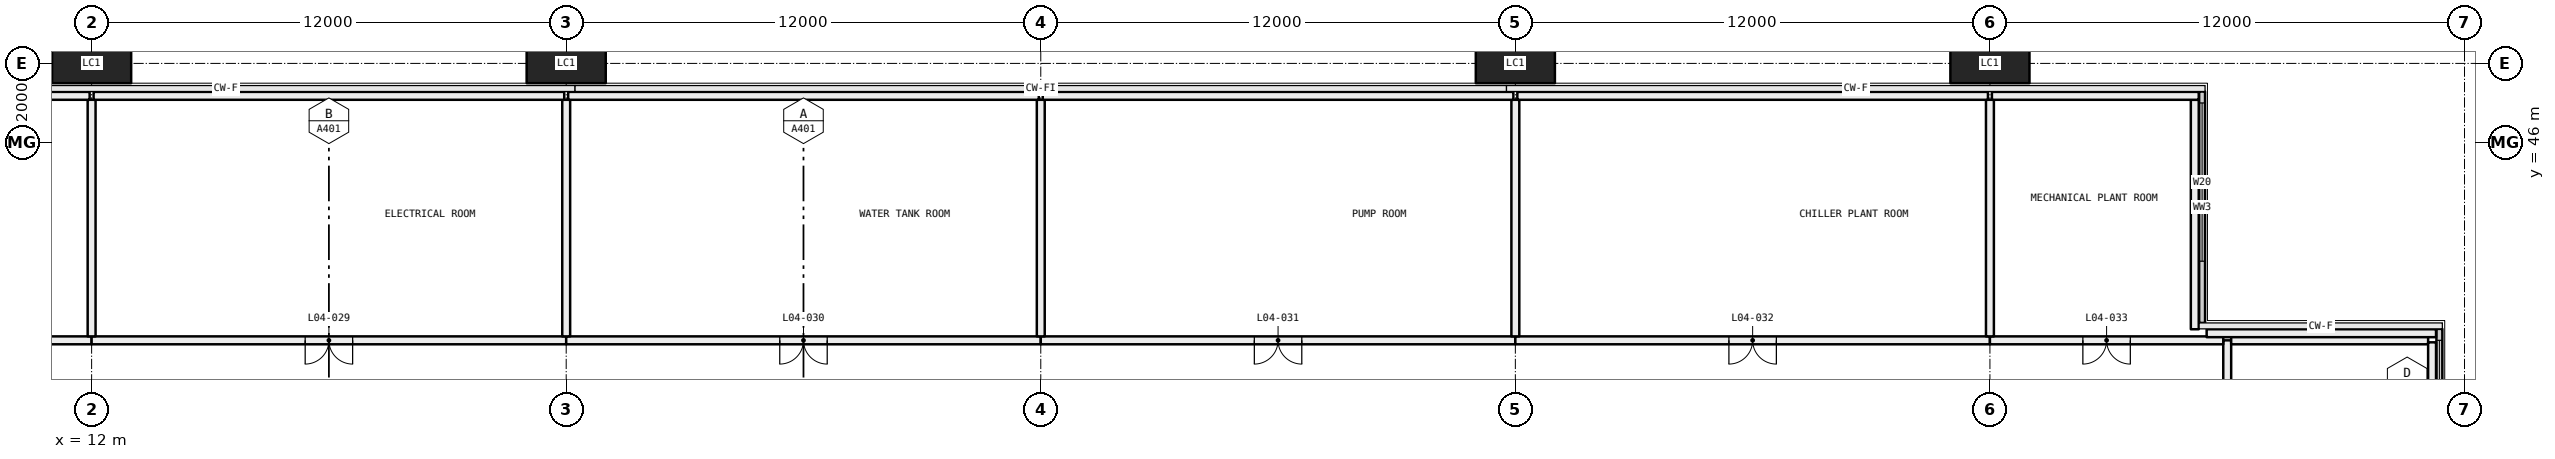
"""IFC4 building model, lengths in metres.
Left out: names, types, materials, properties, quantities, classifications, styles, units other than length and angle.
Written with IfcOpenShell. Run it as: python <this file> out.ifc"""

import sys

from ifc_helpers import new_model, si_unit, direction, frame, frame_2d, origin, origin_2d, place, context, subcontext, project, spatial, rectangle, hollow_rectangle, extrude, element, fill, save


model = new_model("IFC4")
c1 = context("Model", 3, precision=1e-05, world=origin(), true_north=direction((0.0, 1.0)))
c2 = subcontext(c1, "Body", "Model", "MODEL_VIEW")
j1 = project(units=[si_unit("LENGTHUNIT", "METRE"), si_unit("PLANEANGLEUNIT", "RADIAN")], contexts=[c1])
p1 = place(None, origin())
s1 = spatial("IfcSite", under=j1, at=p1, CompositionType="ELEMENT")
p2 = place(p1, origin())
s2 = spatial("IfcBuilding", under=s1, at=p2, CompositionType="ELEMENT")
p3 = place(p2, frame((0.0, 0.0, 24.0)))
s3 = spatial("IfcBuildingStorey", under=s2, at=p3, CompositionType="ELEMENT", Elevation=24.0)
for number, where, z_axis, x_axis in (
    (1, (12.0, 48.0, -0.4), (0.0, 0.0, 1.0), (1.0, 0.0, 0.0)),
    (2, (24.0, 48.0, -0.4), (0.0, 0.0, 1.0), (1.0, 0.0, 0.0)),
    (3, (48.0, 48.0, -0.4), (0.0, 0.0, 1.0), (1.0, 0.0, 0.0)),
    (4, (60.0, 48.0, -0.4), (0.0, 0.0, 1.0), (1.0, 0.0, 0.0)),
):
    element("IfcColumn", number, at=place(p3, frame(where, z_axis=z_axis, x_axis=x_axis)), inside=s3, PredefinedType="COLUMN", context=c2, shape_type="SweptSolid", body=[
        extrude(hollow_rectangle(XDim=2.0, YDim=1.0, WallThickness=0.08, at=origin_2d()), origin(), (0.0, 0.0, 1.0), 6.0),
    ])
p4 = place(p3, frame((71.365, 6.71, 0.0), z_axis=(0.0, 0.0, 1.0), x_axis=(0.0, 1.0, 0.0)))
e5 = element("IfcWall", 5, at=p4, inside=s3, PredefinedType="ELEMENTEDWALL", context=c2, shape_type="SweptSolid", body=[
    extrude(rectangle(XDim=34.58, YDim=0.15, at=frame_2d((17.29, 0.0))), origin(), (0.0, 0.0, 1.0), 5.6),
])
p5 = place(p4, frame((0.29, 0.0, 3.0)))
e6 = element("IfcOpeningElement", 6, at=p5, cuts=e5, PredefinedType="OPENING", context=c2, shape_type="SweptSolid", body=[
    extrude(rectangle(XDim=4.5, YDim=2.55, at=frame_2d((2.25, 1.275))), frame((0.0, 0.085, 0.0), z_axis=(0.0, -1.0, 0.0), x_axis=(1.0, 0.0, 0.0)), (0.0, 0.0, 1.0), 0.17),
])
p6 = place(p4, frame((5.79, 0.0, 3.0)))
e7 = element("IfcOpeningElement", 7, at=p6, cuts=e5, PredefinedType="OPENING", context=c2, shape_type="SweptSolid", body=[
    extrude(rectangle(XDim=5.0, YDim=2.55, at=frame_2d((2.5, 1.275))), frame((0.0, 0.085, 0.0), z_axis=(0.0, -1.0, 0.0), x_axis=(1.0, 0.0, 0.0)), (0.0, 0.0, 1.0), 0.17),
])
p7 = place(p4, frame((11.79, 0.0, 3.0)))
e8 = element("IfcOpeningElement", 8, at=p7, cuts=e5, PredefinedType="OPENING", context=c2, shape_type="SweptSolid", body=[
    extrude(rectangle(XDim=5.0, YDim=2.55, at=frame_2d((2.5, 1.275))), frame((0.0, 0.085, 0.0), z_axis=(0.0, -1.0, 0.0), x_axis=(1.0, 0.0, 0.0)), (0.0, 0.0, 1.0), 0.17),
])
p8 = place(p4, frame((17.79, 0.0, 3.0)))
e9 = element("IfcOpeningElement", 9, at=p8, cuts=e5, PredefinedType="OPENING", context=c2, shape_type="SweptSolid", body=[
    extrude(rectangle(XDim=5.0, YDim=2.55, at=frame_2d((2.5, 1.275))), frame((0.0, 0.085, 0.0), z_axis=(0.0, -1.0, 0.0), x_axis=(1.0, 0.0, 0.0)), (0.0, 0.0, 1.0), 0.17),
])
p9 = place(p4, frame((23.79, 0.0, 3.0)))
e10 = element("IfcOpeningElement", 10, at=p9, cuts=e5, PredefinedType="OPENING", context=c2, shape_type="SweptSolid", body=[
    extrude(rectangle(XDim=2.0, YDim=2.55, at=frame_2d((1.0, 1.275))), frame((0.0, 0.085, 0.0), z_axis=(0.0, -1.0, 0.0), x_axis=(1.0, 0.0, 0.0)), (0.0, 0.0, 1.0), 0.17),
])
p10 = place(p4, frame((26.79, 0.0, 3.0)))
e11 = element("IfcOpeningElement", 11, at=p10, cuts=e5, PredefinedType="OPENING", context=c2, shape_type="SweptSolid", body=[
    extrude(rectangle(XDim=2.0, YDim=2.55, at=frame_2d((1.0, 1.275))), frame((0.0, 0.085, 0.0), z_axis=(0.0, -1.0, 0.0), x_axis=(1.0, 0.0, 0.0)), (0.0, 0.0, 1.0), 0.17),
])
p11 = place(p4, frame((29.79, 0.0, 3.0)))
e12 = element("IfcOpeningElement", 12, at=p11, cuts=e5, PredefinedType="OPENING", context=c2, shape_type="SweptSolid", body=[
    extrude(rectangle(XDim=4.5, YDim=2.55, at=frame_2d((2.25, 1.275))), frame((0.0, 0.085, 0.0), z_axis=(0.0, -1.0, 0.0), x_axis=(1.0, 0.0, 0.0)), (0.0, 0.0, 1.0), 0.17),
])
p12 = place(p3, frame((65.365, 41.44, 0.0), z_axis=(0.0, 0.0, 1.0), x_axis=(0.0, 1.0, 0.0)))
e13 = element("IfcWall", 13, at=p12, inside=s3, PredefinedType="ELEMENTEDWALL", context=c2, shape_type="SweptSolid", body=[
    extrude(rectangle(XDim=5.85, YDim=0.15, at=frame_2d((2.925, 0.0))), origin(), (0.0, 0.0, 1.0), 5.6),
])
p13 = place(p12, frame((1.56, 0.0, 3.0)))
e14 = element("IfcOpeningElement", 14, at=p13, cuts=e13, PredefinedType="OPENING", context=c2, shape_type="SweptSolid", body=[
    extrude(rectangle(XDim=4.0, YDim=2.55, at=frame_2d((2.0, 1.275))), frame((0.0, 0.085, 0.0), z_axis=(0.0, -1.0, 0.0), x_axis=(1.0, 0.0, 0.0)), (0.0, 0.0, 1.0), 0.17),
])
p14 = place(p3, frame((66.0, 36.1, 0.0), z_axis=(0.0, 0.0, 1.0), x_axis=(0.0, 1.0, 0.0)))
e15 = element("IfcWall", 15, at=p14, inside=s3, PredefinedType="PARTITIONING", context=c2, shape_type="SweptSolid", body=[
    extrude(rectangle(XDim=4.9, YDim=0.2, at=frame_2d((2.45, 0.0))), origin(), (0.0, 0.0, 1.0), 5.6),
])
p15 = place(p3, frame((12.0, 41.0, 0.0), z_axis=(0.0, 0.0, 1.0), x_axis=(-1.0, 0.0, 0.0)))
e16 = element("IfcWall", 16, at=p15, inside=s3, PredefinedType="PARTITIONING", context=c2, shape_type="SweptSolid", body=[
    extrude(rectangle(XDim=5.9, YDim=0.2, at=frame_2d((2.95, 0.0))), origin(), (0.0, 0.0, 1.0), 5.6),
])
p16 = place(p15, frame((2.35, 0.0, 0.0)))
e17 = element("IfcOpeningElement", 17, at=p16, cuts=e16, PredefinedType="OPENING", context=c2, shape_type="SweptSolid", body=[
    extrude(rectangle(XDim=1.2, YDim=2.1, at=frame_2d((0.6, 1.05))), frame((0.0, 0.11, 0.0), z_axis=(0.0, -1.0, 0.0), x_axis=(1.0, 0.0, 0.0)), (0.0, 0.0, 1.0), 0.22),
])
p17 = place(p3, frame((24.0, 41.0, 0.0), z_axis=(0.0, 0.0, 1.0), x_axis=(-1.0, 0.0, 0.0)))
e18 = element("IfcWall", 18, at=p17, inside=s3, PredefinedType="PARTITIONING", context=c2, shape_type="SweptSolid", body=[
    extrude(rectangle(XDim=12.0, YDim=0.2, at=frame_2d((6.0, 0.0))), origin(), (0.0, 0.0, 1.0), 5.6),
])
p18 = place(p17, frame((5.4, 0.0, 0.0)))
e19 = element("IfcOpeningElement", 19, at=p18, cuts=e18, PredefinedType="OPENING", context=c2, shape_type="SweptSolid", body=[
    extrude(rectangle(XDim=1.2, YDim=2.1, at=frame_2d((0.6, 1.05))), frame((0.0, 0.11, 0.0), z_axis=(0.0, -1.0, 0.0), x_axis=(1.0, 0.0, 0.0)), (0.0, 0.0, 1.0), 0.22),
])
p19 = place(p3, frame((36.0, 41.0, 0.0), z_axis=(0.0, 0.0, 1.0), x_axis=(-1.0, 0.0, 0.0)))
e20 = element("IfcWall", 20, at=p19, inside=s3, PredefinedType="PARTITIONING", context=c2, shape_type="SweptSolid", body=[
    extrude(rectangle(XDim=12.0, YDim=0.2, at=frame_2d((6.0, 0.0))), origin(), (0.0, 0.0, 1.0), 5.6),
])
p20 = place(p19, frame((5.4, 0.0, 0.0)))
e21 = element("IfcOpeningElement", 21, at=p20, cuts=e20, PredefinedType="OPENING", context=c2, shape_type="SweptSolid", body=[
    extrude(rectangle(XDim=1.2, YDim=2.1, at=frame_2d((0.6, 1.05))), frame((0.0, 0.11, 0.0), z_axis=(0.0, -1.0, 0.0), x_axis=(1.0, 0.0, 0.0)), (0.0, 0.0, 1.0), 0.22),
])
p21 = place(p3, frame((48.0, 41.0, 0.0), z_axis=(0.0, 0.0, 1.0), x_axis=(-1.0, 0.0, 0.0)))
e22 = element("IfcWall", 22, at=p21, inside=s3, PredefinedType="PARTITIONING", context=c2, shape_type="SweptSolid", body=[
    extrude(rectangle(XDim=12.0, YDim=0.2, at=frame_2d((6.0, 0.0))), origin(), (0.0, 0.0, 1.0), 5.6),
])
p22 = place(p21, frame((5.4, 0.0, 0.0)))
e23 = element("IfcOpeningElement", 23, at=p22, cuts=e22, PredefinedType="OPENING", context=c2, shape_type="SweptSolid", body=[
    extrude(rectangle(XDim=1.2, YDim=2.1, at=frame_2d((0.6, 1.05))), frame((0.0, 0.11, 0.0), z_axis=(0.0, -1.0, 0.0), x_axis=(1.0, 0.0, 0.0)), (0.0, 0.0, 1.0), 0.22),
])
p23 = place(p3, frame((60.0, 41.0, 0.0), z_axis=(0.0, 0.0, 1.0), x_axis=(-1.0, 0.0, 0.0)))
e24 = element("IfcWall", 24, at=p23, inside=s3, PredefinedType="PARTITIONING", context=c2, shape_type="SweptSolid", body=[
    extrude(rectangle(XDim=12.0, YDim=0.2, at=frame_2d((6.0, 0.0))), origin(), (0.0, 0.0, 1.0), 5.6),
])
p24 = place(p23, frame((5.4, 0.0, 0.0)))
e25 = element("IfcOpeningElement", 25, at=p24, cuts=e24, PredefinedType="OPENING", context=c2, shape_type="SweptSolid", body=[
    extrude(rectangle(XDim=1.2, YDim=2.1, at=frame_2d((0.6, 1.05))), frame((0.0, 0.11, 0.0), z_axis=(0.0, -1.0, 0.0), x_axis=(1.0, 0.0, 0.0)), (0.0, 0.0, 1.0), 0.22),
])
p25 = place(p3, frame((65.9, 41.0, 0.0), z_axis=(0.0, 0.0, 1.0), x_axis=(-1.0, 0.0, 0.0)))
e26 = element("IfcWall", 26, at=p25, inside=s3, PredefinedType="PARTITIONING", context=c2, shape_type="SweptSolid", body=[
    extrude(rectangle(XDim=5.9, YDim=0.2, at=frame_2d((2.95, 0.0))), origin(), (0.0, 0.0, 1.0), 5.6),
])
p26 = place(p25, frame((2.35, 0.0, 0.0)))
e27 = element("IfcOpeningElement", 27, at=p26, cuts=e26, PredefinedType="OPENING", context=c2, shape_type="SweptSolid", body=[
    extrude(rectangle(XDim=1.2, YDim=2.1, at=frame_2d((0.6, 1.05))), frame((0.0, 0.11, 0.0), z_axis=(0.0, -1.0, 0.0), x_axis=(1.0, 0.0, 0.0)), (0.0, 0.0, 1.0), 0.22),
])
p27 = place(p3, frame((71.08, 41.0, 0.0), z_axis=(0.0, 0.0, 1.0), x_axis=(-1.0, 0.0, 0.0)))
e28 = element("IfcWall", 28, at=p27, inside=s3, PredefinedType="PARTITIONING", context=c2, shape_type="SweptSolid", body=[
    extrude(rectangle(XDim=4.98, YDim=0.2, at=frame_2d((2.49, 0.0))), origin(), (0.0, 0.0, 1.0), 5.6),
])
for number, where, z_axis, x_axis in (
    (29, (12.0, 41.1, 0.0), (0.0, 0.0, 1.0), (0.0, 1.0, 0.0)),
    (30, (24.0, 41.1, 0.0), (0.0, 0.0, 1.0), (0.0, 1.0, 0.0)),
    (31, (36.0, 41.1, 0.0), (0.0, 0.0, 1.0), (0.0, 1.0, 0.0)),
    (32, (48.0, 41.1, 0.0), (0.0, 0.0, 1.0), (0.0, 1.0, 0.0)),
    (33, (60.0, 41.1, 0.0), (0.0, 0.0, 1.0), (0.0, 1.0, 0.0)),
):
    element("IfcWall", number, at=place(p3, frame(where, z_axis=z_axis, x_axis=x_axis)), inside=s3, PredefinedType="PARTITIONING", context=c2, shape_type="SweptSolid", body=[
        extrude(rectangle(XDim=5.98, YDim=0.2, at=frame_2d((2.99, 0.0))), origin(), (0.0, 0.0, 1.0), 5.6),
    ])
p28 = place(p3, frame((71.18, 36.1, 0.0), z_axis=(0.0, 0.0, 1.0), x_axis=(0.0, 1.0, 0.0)))
e34 = element("IfcWall", 34, at=p28, inside=s3, PredefinedType="PARTITIONING", context=c2, shape_type="SweptSolid", body=[
    extrude(rectangle(XDim=4.85, YDim=0.2, at=frame_2d((2.425, 0.0))), origin(), (0.0, 0.0, 1.0), 5.6),
])
p29 = place(p3, frame((11.95, 47.18, 0.0), z_axis=(0.0, 0.0, 1.0), x_axis=(-1.0, 0.0, 0.0)))
e35 = element("IfcWall", 35, at=p29, inside=s3, PredefinedType="PARTITIONING", context=c2, shape_type="SweptSolid", body=[
    extrude(rectangle(XDim=5.03, YDim=0.2, at=frame_2d((2.515, 0.0))), origin(), (0.0, 0.0, 1.0), 5.6),
])
for number, where, z_axis, x_axis in (
    (36, (23.95, 47.18, 0.0), (0.0, 0.0, 1.0), (-1.0, 0.0, 0.0)),
    (37, (35.95, 47.18, 0.0), (0.0, 0.0, 1.0), (-1.0, 0.0, 0.0)),
    (38, (47.95, 47.18, 0.0), (0.0, 0.0, 1.0), (-1.0, 0.0, 0.0)),
    (39, (59.95, 47.18, 0.0), (0.0, 0.0, 1.0), (-1.0, 0.0, 0.0)),
):
    element("IfcWall", number, at=place(p3, frame(where, z_axis=z_axis, x_axis=x_axis)), inside=s3, PredefinedType="PARTITIONING", context=c2, shape_type="SweptSolid", body=[
        extrude(rectangle(XDim=11.9, YDim=0.2, at=frame_2d((5.95, 0.0))), origin(), (0.0, 0.0, 1.0), 5.6),
    ])
for number, where, z_axis, x_axis in (
    (40, (71.28, 41.18, 0.0), (0.0, 0.0, 1.0), (-1.0, 0.0, 0.0)),
    (41, (65.18, 41.28, 0.0), (0.0, 0.0, 1.0), (0.0, 1.0, 0.0)),
):
    element("IfcWall", number, at=place(p3, frame(where, z_axis=z_axis, x_axis=x_axis)), inside=s3, PredefinedType="PARTITIONING", context=c2, shape_type="SweptSolid", body=[
        extrude(rectangle(XDim=5.8, YDim=0.2, at=frame_2d((2.9, 0.0))), origin(), (0.0, 0.0, 1.0), 5.6),
    ])
p30 = place(p3, frame((65.28, 47.18, 0.0), z_axis=(0.0, 0.0, 1.0), x_axis=(-1.0, 0.0, 0.0)))
e42 = element("IfcWall", 42, at=p30, inside=s3, PredefinedType="PARTITIONING", context=c2, shape_type="SweptSolid", body=[
    extrude(rectangle(XDim=5.23, YDim=0.2, at=frame_2d((2.615, 0.0))), origin(), (0.0, 0.0, 1.0), 5.6),
])
p31 = place(p11, origin())
e43 = element("IfcWindow", 43, at=p31, inside=s3, PartitioningType="SINGLE_PANEL", PredefinedType="WINDOW", context=c2, shape_type="SweptSolid", body=[
    extrude(rectangle(XDim=4.5, YDim=2.55, at=frame_2d((2.25, 1.275))), frame((0.0, 0.03, 0.0), z_axis=(0.0, -1.0, 0.0), x_axis=(1.0, 0.0, 0.0)), (0.0, 0.0, 1.0), 0.06),
])
fill(e12, e43)
p32 = place(p13, origin())
e44 = element("IfcWindow", 44, at=p32, inside=s3, PartitioningType="SINGLE_PANEL", PredefinedType="WINDOW", context=c2, shape_type="SweptSolid", body=[
    extrude(rectangle(XDim=4.0, YDim=2.55, at=frame_2d((2.0, 1.275))), frame((0.0, 0.03, 0.0), z_axis=(0.0, -1.0, 0.0), x_axis=(1.0, 0.0, 0.0)), (0.0, 0.0, 1.0), 0.06),
])
fill(e14, e44)
p33 = place(p18, origin())
e45 = element("IfcDoor", 45, at=p33, inside=s3, OperationType="DOUBLE_DOOR_SINGLE_SWING", PredefinedType="DOOR", context=c2, shape_type="SweptSolid", body=[
    extrude(rectangle(XDim=1.2, YDim=2.1, at=frame_2d((0.6, 1.05))), frame((0.0, 0.025, 0.0), z_axis=(0.0, -1.0, 0.0), x_axis=(1.0, 0.0, 0.0)), (0.0, 0.0, 1.0), 0.05),
])
fill(e19, e45)
p34 = place(p20, origin())
e46 = element("IfcDoor", 46, at=p34, inside=s3, OperationType="DOUBLE_DOOR_SINGLE_SWING", PredefinedType="DOOR", context=c2, shape_type="SweptSolid", body=[
    extrude(rectangle(XDim=1.2, YDim=2.1, at=frame_2d((0.6, 1.05))), frame((0.0, 0.025, 0.0), z_axis=(0.0, -1.0, 0.0), x_axis=(1.0, 0.0, 0.0)), (0.0, 0.0, 1.0), 0.05),
])
fill(e21, e46)
p35 = place(p22, origin())
e47 = element("IfcDoor", 47, at=p35, inside=s3, OperationType="DOUBLE_DOOR_SINGLE_SWING", PredefinedType="DOOR", context=c2, shape_type="SweptSolid", body=[
    extrude(rectangle(XDim=1.2, YDim=2.1, at=frame_2d((0.6, 1.05))), frame((0.0, 0.025, 0.0), z_axis=(0.0, -1.0, 0.0), x_axis=(1.0, 0.0, 0.0)), (0.0, 0.0, 1.0), 0.05),
])
fill(e23, e47)
p36 = place(p24, origin())
e48 = element("IfcDoor", 48, at=p36, inside=s3, OperationType="DOUBLE_DOOR_SINGLE_SWING", PredefinedType="DOOR", context=c2, shape_type="SweptSolid", body=[
    extrude(rectangle(XDim=1.2, YDim=2.1, at=frame_2d((0.6, 1.05))), frame((0.0, 0.025, 0.0), z_axis=(0.0, -1.0, 0.0), x_axis=(1.0, 0.0, 0.0)), (0.0, 0.0, 1.0), 0.05),
])
fill(e25, e48)
p37 = place(p26, origin())
e49 = element("IfcDoor", 49, at=p37, inside=s3, OperationType="DOUBLE_DOOR_SINGLE_SWING", PredefinedType="DOOR", context=c2, shape_type="SweptSolid", body=[
    extrude(rectangle(XDim=1.2, YDim=2.1, at=frame_2d((0.6, 1.05))), frame((0.0, 0.025, 0.0), z_axis=(0.0, -1.0, 0.0), x_axis=(1.0, 0.0, 0.0)), (0.0, 0.0, 1.0), 0.05),
])
fill(e27, e49)
save(model, sys.argv[1])
